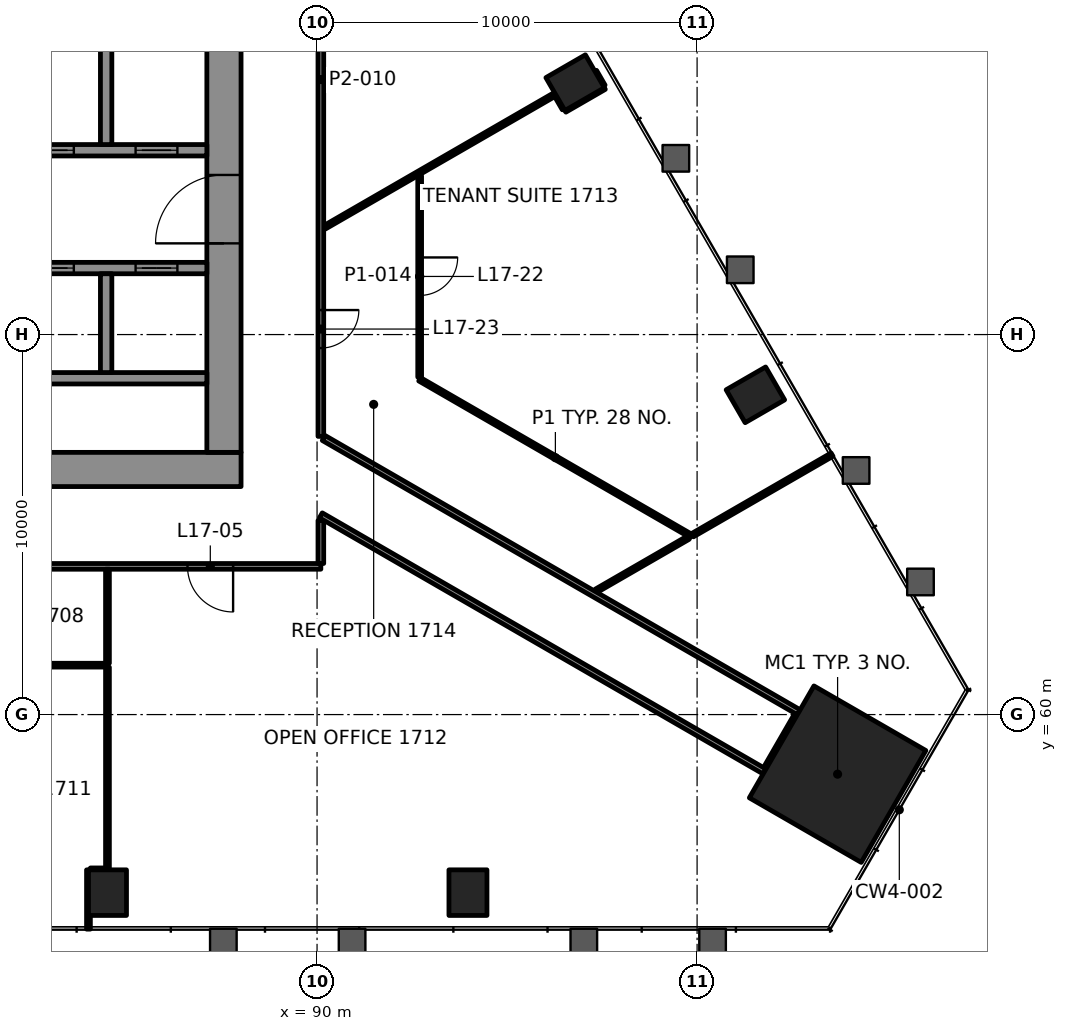
"""IFC4 building model, lengths in metres.
Left out: names, types, materials, properties, quantities, classifications, styles, units other than length and angle.
Written with IfcOpenShell. Run it as: python <this file> out.ifc"""

import sys

from ifc_helpers import new_model, si_unit, direction, frame, frame_2d, origin, origin_2d, place, context, subcontext, project, spatial, rectangle, extrude, element, fill, save


model = new_model("IFC4")
c1 = context("Model", 3, precision=1e-05, world=origin(), true_north=direction((0.0, 1.0)))
c2 = subcontext(c1, "Body", "Model", "MODEL_VIEW")
j1 = project(units=[si_unit("LENGTHUNIT", "METRE"), si_unit("PLANEANGLEUNIT", "RADIAN")], contexts=[c1])
p1 = place(None, origin())
s1 = spatial("IfcSite", under=j1, at=p1, CompositionType="ELEMENT")
p2 = place(p1, origin())
s2 = spatial("IfcBuilding", under=s1, at=p2, CompositionType="ELEMENT")
p3 = place(p2, frame((0.0, 0.0, 77.8)))
s3 = spatial("IfcBuildingStorey", under=s2, at=p3, CompositionType="ELEMENT", Elevation=77.8)
p4 = place(p3, frame((103.697, 58.432, 0.0), z_axis=(0.0, 0.0, 1.0), x_axis=(0.5, 0.866025403784, 0.0)))
e1 = element("IfcColumn", 1, at=p4, inside=s3, PredefinedType="COLUMN", context=c2, shape_type="SweptSolid", body=[
    extrude(rectangle(XDim=3.4, YDim=3.4, at=origin_2d()), origin(), (0.0, 0.0, 1.0), 4.2),
])
for number, where, z_axis, x_axis in (
    (2, (84.485, 55.314, -0.0), (0.0, 0.0, 1.0), (1.0, 0.0, 0.0)),
    (3, (93.971, 55.314, -0.0), (0.0, 0.0, 1.0), (1.0, 0.0, 0.0)),
    (4, (101.534, 68.414, -0.0), (0.0, 0.0, 1.0), (-0.5, 0.866, 0.0)),
    (5, (96.791, 76.628, -0.0), (0.0, 0.0, 1.0), (-0.5, 0.866, 0.0)),
):
    element("IfcColumn", number, at=place(p3, frame(where, z_axis=z_axis, x_axis=x_axis)), inside=s3, PredefinedType="COLUMN", context=c2, shape_type="SweptSolid", body=[
        extrude(rectangle(XDim=1.0, YDim=1.2, at=origin_2d()), origin(), (0.0, 0.0, 1.0), 4.2),
    ])
p5 = place(p3, frame((62.0, 66.45, 0.0), z_axis=(0.0, 0.0, 1.0), x_axis=(1.0, 0.0, 0.0)))
e6 = element("IfcWall", 6, at=p5, inside=s3, PredefinedType="SHEAR", context=c2, shape_type="SweptSolid", body=[
    extrude(rectangle(XDim=26.0, YDim=0.9, at=frame_2d((13.0, 0.0))), origin(), (0.0, 0.0, 1.0), 4.0),
])
p6 = place(p5, frame((3.45, 0.0, 0.0)))
e7 = element("IfcOpeningElement", 7, at=p6, cuts=e6, PredefinedType="OPENING", context=c2, shape_type="SweptSolid", body=[
    extrude(rectangle(XDim=0.9, YDim=2.1, at=frame_2d((0.45, 1.05))), frame((0.0, 0.46, 0.0), z_axis=(0.0, -1.0, 0.0), x_axis=(1.0, 0.0, 0.0)), (0.0, 0.0, 1.0), 0.92),
])
p7 = place(p5, frame((5.637, 0.0, 0.0)))
e8 = element("IfcOpeningElement", 8, at=p7, cuts=e6, PredefinedType="OPENING", context=c2, shape_type="SweptSolid", body=[
    extrude(rectangle(XDim=0.9, YDim=2.1, at=frame_2d((0.45, 1.05))), frame((0.0, 0.46, 0.0), z_axis=(0.0, -1.0, 0.0), x_axis=(1.0, 0.0, 0.0)), (0.0, 0.0, 1.0), 0.92),
])
p8 = place(p5, frame((7.212, 0.0, 0.0)))
e9 = element("IfcOpeningElement", 9, at=p8, cuts=e6, PredefinedType="OPENING", context=c2, shape_type="SweptSolid", body=[
    extrude(rectangle(XDim=0.9, YDim=2.1, at=frame_2d((0.45, 1.05))), frame((0.0, 0.46, 0.0), z_axis=(0.0, -1.0, 0.0), x_axis=(1.0, 0.0, 0.0)), (0.0, 0.0, 1.0), 0.92),
])
p9 = place(p5, frame((8.999, 0.0, 0.0)))
e10 = element("IfcOpeningElement", 10, at=p9, cuts=e6, PredefinedType="OPENING", context=c2, shape_type="SweptSolid", body=[
    extrude(rectangle(XDim=0.9, YDim=2.1, at=frame_2d((0.45, 1.05))), frame((0.0, 0.46, 0.0), z_axis=(0.0, -1.0, 0.0), x_axis=(1.0, 0.0, 0.0)), (0.0, 0.0, 1.0), 0.92),
])
p10 = place(p5, frame((17.324, 0.0, 0.0)))
e11 = element("IfcOpeningElement", 11, at=p10, cuts=e6, PredefinedType="OPENING", context=c2, shape_type="SweptSolid", body=[
    extrude(rectangle(XDim=0.9, YDim=2.1, at=frame_2d((0.45, 1.05))), frame((0.0, 0.46, 0.0), z_axis=(0.0, -1.0, 0.0), x_axis=(1.0, 0.0, 0.0)), (0.0, 0.0, 1.0), 0.92),
])
p11 = place(p3, frame((87.55, 66.9, 0.0), z_axis=(0.0, 0.0, 1.0), x_axis=(0.0, 1.0, 0.0)))
e12 = element("IfcWall", 12, at=p11, inside=s3, PredefinedType="SHEAR", context=c2, shape_type="SweptSolid", body=[
    extrude(rectangle(XDim=16.2, YDim=0.9, at=frame_2d((8.1, 0.0))), origin(), (0.0, 0.0, 1.0), 4.0),
])
p12 = place(p11, frame((5.5, 0.0, 0.0)))
e13 = element("IfcOpeningElement", 13, at=p12, cuts=e12, PredefinedType="OPENING", context=c2, shape_type="SweptSolid", body=[
    extrude(rectangle(XDim=1.8, YDim=2.1, at=frame_2d((0.9, 1.05))), frame((0.0, 0.46, 0.0), z_axis=(0.0, -1.0, 0.0), x_axis=(1.0, 0.0, 0.0)), (0.0, 0.0, 1.0), 0.92),
])
p13 = place(p11, frame((11.202, 0.0, 0.0)))
e14 = element("IfcOpeningElement", 14, at=p13, cuts=e12, PredefinedType="OPENING", context=c2, shape_type="SweptSolid", body=[
    extrude(rectangle(XDim=0.9, YDim=2.1, at=frame_2d((0.45, 1.05))), frame((0.0, 0.46, 0.0), z_axis=(0.0, -1.0, 0.0), x_axis=(1.0, 0.0, 0.0)), (0.0, 0.0, 1.0), 0.92),
])
p14 = place(p3, frame((70.35, 68.85, 0.0), z_axis=(0.0, 0.0, 1.0), x_axis=(1.0, 0.0, 0.0)))
e15 = element("IfcWall", 15, at=p14, inside=s3, PredefinedType="SHEAR", context=c2, shape_type="SweptSolid", body=[
    extrude(rectangle(XDim=16.75, YDim=0.3, at=frame_2d((8.375, 0.0))), origin(), (0.0, 0.0, 1.0), 4.0),
])
p15 = place(p3, frame((70.3, 71.75, 0.0), z_axis=(0.0, 0.0, 1.0), x_axis=(1.0, 0.0, 0.0)))
e16 = element("IfcWall", 16, at=p15, inside=s3, PredefinedType="SHEAR", context=c2, shape_type="SweptSolid", body=[
    extrude(rectangle(XDim=16.8, YDim=0.3, at=frame_2d((8.4, 0.0))), origin(), (0.0, 0.0, 1.0), 4.0),
])
p16 = place(p15, frame((1.0, 0.0, 0.0)))
e17 = element("IfcOpeningElement", 17, at=p16, cuts=e16, PredefinedType="OPENING", context=c2, shape_type="SweptSolid", body=[
    extrude(rectangle(XDim=1.1, YDim=2.1, at=frame_2d((0.55, 1.05))), frame((0.0, 0.16, 0.0), z_axis=(0.0, -1.0, 0.0), x_axis=(1.0, 0.0, 0.0)), (0.0, 0.0, 1.0), 0.32),
])
p17 = place(p15, frame((3.8, 0.0, 0.0)))
e18 = element("IfcOpeningElement", 18, at=p17, cuts=e16, PredefinedType="OPENING", context=c2, shape_type="SweptSolid", body=[
    extrude(rectangle(XDim=1.1, YDim=2.1, at=frame_2d((0.55, 1.05))), frame((0.0, 0.16, 0.0), z_axis=(0.0, -1.0, 0.0), x_axis=(1.0, 0.0, 0.0)), (0.0, 0.0, 1.0), 0.32),
])
p18 = place(p15, frame((6.6, 0.0, 0.0)))
e19 = element("IfcOpeningElement", 19, at=p18, cuts=e16, PredefinedType="OPENING", context=c2, shape_type="SweptSolid", body=[
    extrude(rectangle(XDim=1.1, YDim=2.1, at=frame_2d((0.55, 1.05))), frame((0.0, 0.16, 0.0), z_axis=(0.0, -1.0, 0.0), x_axis=(1.0, 0.0, 0.0)), (0.0, 0.0, 1.0), 0.32),
])
p19 = place(p15, frame((9.4, 0.0, 0.0)))
e20 = element("IfcOpeningElement", 20, at=p19, cuts=e16, PredefinedType="OPENING", context=c2, shape_type="SweptSolid", body=[
    extrude(rectangle(XDim=1.1, YDim=2.1, at=frame_2d((0.55, 1.05))), frame((0.0, 0.16, 0.0), z_axis=(0.0, -1.0, 0.0), x_axis=(1.0, 0.0, 0.0)), (0.0, 0.0, 1.0), 0.32),
])
p20 = place(p15, frame((12.2, 0.0, 0.0)))
e21 = element("IfcOpeningElement", 21, at=p20, cuts=e16, PredefinedType="OPENING", context=c2, shape_type="SweptSolid", body=[
    extrude(rectangle(XDim=1.1, YDim=2.1, at=frame_2d((0.55, 1.05))), frame((0.0, 0.16, 0.0), z_axis=(0.0, -1.0, 0.0), x_axis=(1.0, 0.0, 0.0)), (0.0, 0.0, 1.0), 0.32),
])
p21 = place(p15, frame((14.925, 0.0, 0.0)))
e22 = element("IfcOpeningElement", 22, at=p21, cuts=e16, PredefinedType="OPENING", context=c2, shape_type="SweptSolid", body=[
    extrude(rectangle(XDim=1.1, YDim=2.1, at=frame_2d((0.55, 1.05))), frame((0.0, 0.16, 0.0), z_axis=(0.0, -1.0, 0.0), x_axis=(1.0, 0.0, 0.0)), (0.0, 0.0, 1.0), 0.32),
])
p22 = place(p3, frame((70.3, 74.85, 0.0), z_axis=(0.0, 0.0, 1.0), x_axis=(1.0, 0.0, 0.0)))
e23 = element("IfcWall", 23, at=p22, inside=s3, PredefinedType="SHEAR", context=c2, shape_type="SweptSolid", body=[
    extrude(rectangle(XDim=16.8, YDim=0.3, at=frame_2d((8.4, 0.0))), origin(), (0.0, 0.0, 1.0), 4.0),
])
p23 = place(p22, frame((3.8, 0.0, 0.0)))
e24 = element("IfcOpeningElement", 24, at=p23, cuts=e23, PredefinedType="OPENING", context=c2, shape_type="SweptSolid", body=[
    extrude(rectangle(XDim=1.1, YDim=2.1, at=frame_2d((0.55, 1.05))), frame((0.0, 0.16, 0.0), z_axis=(0.0, -1.0, 0.0), x_axis=(1.0, 0.0, 0.0)), (0.0, 0.0, 1.0), 0.32),
])
p24 = place(p22, frame((12.2, 0.0, 0.0)))
e25 = element("IfcOpeningElement", 25, at=p24, cuts=e23, PredefinedType="OPENING", context=c2, shape_type="SweptSolid", body=[
    extrude(rectangle(XDim=1.1, YDim=2.1, at=frame_2d((0.55, 1.05))), frame((0.0, 0.16, 0.0), z_axis=(0.0, -1.0, 0.0), x_axis=(1.0, 0.0, 0.0)), (0.0, 0.0, 1.0), 0.32),
])
p25 = place(p22, frame((14.925, 0.0, 0.0)))
e26 = element("IfcOpeningElement", 26, at=p25, cuts=e23, PredefinedType="OPENING", context=c2, shape_type="SweptSolid", body=[
    extrude(rectangle(XDim=1.1, YDim=2.1, at=frame_2d((0.55, 1.05))), frame((0.0, 0.16, 0.0), z_axis=(0.0, -1.0, 0.0), x_axis=(1.0, 0.0, 0.0)), (0.0, 0.0, 1.0), 0.32),
])
for number, where, z_axis, x_axis in (
    (27, (84.45, 69.0, 0.0), (0.0, 0.0, 1.0), (0.0, 1.0, 0.0)),
    (28, (84.45, 75.0, 0.0), (0.0, 0.0, 1.0), (0.0, 1.0, 0.0)),
):
    element("IfcWall", number, at=place(p3, frame(where, z_axis=z_axis, x_axis=x_axis)), inside=s3, PredefinedType="SHEAR", context=c2, shape_type="SweptSolid", body=[
        extrude(rectangle(XDim=2.6, YDim=0.3, at=frame_2d((1.3, 0.0))), origin(), (0.0, 0.0, 1.0), 4.0),
    ])
p26 = place(p3, frame((84.036, 55.914, 0.0), z_axis=(0.0, 0.0, 1.0), x_axis=(1.0, 0.0, 0.0)))
e29 = element("IfcWall", 29, at=p26, inside=s3, PredefinedType="PARTITIONING", context=c2, shape_type="SweptSolid", body=[
    extrude(rectangle(XDim=0.399, YDim=0.1, at=frame_2d((0.199, 0.0))), origin(), (0.0, 0.0, 1.0), 3.4),
])
p27 = place(p3, frame((58.271, 61.3, 0.0), z_axis=(0.0, 0.0, 1.0), x_axis=(1.0, 0.0, 0.0)))
e30 = element("IfcWall", 30, at=p27, inside=s3, PredefinedType="PARTITIONING", context=c2, shape_type="SweptSolid", body=[
    extrude(rectangle(XDim=26.214, YDim=0.1, at=frame_2d((13.107, 0.0))), origin(), (0.0, 0.0, 1.0), 3.4),
])
p28 = place(p27, frame((3.122, 0.0, 0.0)))
e31 = element("IfcOpeningElement", 31, at=p28, cuts=e30, PredefinedType="OPENING", context=c2, shape_type="SweptSolid", body=[
    extrude(rectangle(XDim=1.2, YDim=2.1, at=frame_2d((0.6, 1.05))), frame((0.0, 0.06, 0.0), z_axis=(0.0, -1.0, 0.0), x_axis=(1.0, 0.0, 0.0)), (0.0, 0.0, 1.0), 0.12),
])
p29 = place(p27, frame((9.957, 0.0, 0.0)))
e32 = element("IfcOpeningElement", 32, at=p29, cuts=e30, PredefinedType="OPENING", context=c2, shape_type="SweptSolid", body=[
    extrude(rectangle(XDim=0.9, YDim=2.1, at=frame_2d((0.45, 1.05))), frame((0.0, 0.06, 0.0), z_axis=(0.0, -1.0, 0.0), x_axis=(1.0, 0.0, 0.0)), (0.0, 0.0, 1.0), 0.12),
])
p30 = place(p27, frame((16.279, 0.0, 0.0)))
e33 = element("IfcOpeningElement", 33, at=p30, cuts=e30, PredefinedType="OPENING", context=c2, shape_type="SweptSolid", body=[
    extrude(rectangle(XDim=0.9, YDim=2.1, at=frame_2d((0.45, 1.05))), frame((0.0, 0.06, 0.0), z_axis=(0.0, -1.0, 0.0), x_axis=(1.0, 0.0, 0.0)), (0.0, 0.0, 1.0), 0.12),
])
p31 = place(p27, frame((22.501, 0.0, 0.0)))
e34 = element("IfcOpeningElement", 34, at=p31, cuts=e30, PredefinedType="OPENING", context=c2, shape_type="SweptSolid", body=[
    extrude(rectangle(XDim=0.9, YDim=2.1, at=frame_2d((0.45, 1.05))), frame((0.0, 0.06, 0.0), z_axis=(0.0, -1.0, 0.0), x_axis=(1.0, 0.0, 0.0)), (0.0, 0.0, 1.0), 0.12),
])
p32 = place(p3, frame((90.099, 63.9, 0.0), z_axis=(0.0, 0.0, 1.0), x_axis=(-1.0, 0.0, 0.0)))
e35 = element("IfcWall", 35, at=p32, inside=s3, PredefinedType="PARTITIONING", context=c2, shape_type="SweptSolid", body=[
    extrude(rectangle(XDim=30.199, YDim=0.15, at=frame_2d((15.1, 0.0))), origin(), (0.0, 0.0, 1.0), 3.4),
])
p33 = place(p32, frame((2.309, 0.0, 0.0)))
e36 = element("IfcOpeningElement", 36, at=p33, cuts=e35, PredefinedType="OPENING", context=c2, shape_type="SweptSolid", body=[
    extrude(rectangle(XDim=1.2, YDim=2.1, at=frame_2d((0.6, 1.05))), frame((0.0, 0.085, 0.0), z_axis=(0.0, -1.0, 0.0), x_axis=(1.0, 0.0, 0.0)), (0.0, 0.0, 1.0), 0.17),
])
p34 = place(p32, frame((14.599, 0.0, 0.0)))
e37 = element("IfcOpeningElement", 37, at=p34, cuts=e35, PredefinedType="OPENING", context=c2, shape_type="SweptSolid", body=[
    extrude(rectangle(XDim=1.0, YDim=2.1, at=frame_2d((0.5, 1.05))), frame((0.0, 0.085, 0.0), z_axis=(0.0, -1.0, 0.0), x_axis=(1.0, 0.0, 0.0)), (0.0, 0.0, 1.0), 0.17),
])
p35 = place(p32, frame((26.791, 0.0, 0.0)))
e38 = element("IfcOpeningElement", 38, at=p35, cuts=e35, PredefinedType="OPENING", context=c2, shape_type="SweptSolid", body=[
    extrude(rectangle(XDim=1.0, YDim=2.1, at=frame_2d((0.5, 1.05))), frame((0.0, 0.085, 0.0), z_axis=(0.0, -1.0, 0.0), x_axis=(1.0, 0.0, 0.0)), (0.0, 0.0, 1.0), 0.17),
])
p36 = place(p3, frame((97.343, 63.256, 0.0), z_axis=(0.0, 0.0, 1.0), x_axis=(0.866028733576, 0.499994232587, 0.0)))
e39 = element("IfcWall", 39, at=p36, inside=s3, PredefinedType="PARTITIONING", context=c2, shape_type="SweptSolid", body=[
    extrude(rectangle(XDim=2.799, YDim=0.1, at=frame_2d((1.4, 0.0))), origin(), (0.0, 0.0, 1.0), 3.4),
])
p37 = place(p3, frame((96.522, 75.896, 0.0), z_axis=(0.0, 0.0, 1.0), x_axis=(0.865978732077, 0.500080829057, 0.0)))
e40 = element("IfcWall", 40, at=p37, inside=s3, PredefinedType="PARTITIONING", context=c2, shape_type="SweptSolid", body=[
    extrude(rectangle(XDim=1.199, YDim=0.1, at=frame_2d((0.6, 0.0))), origin(), (0.0, 0.0, 1.0), 3.165),
])
p38 = place(p3, frame((90.201, 72.824, 0.0), z_axis=(0.0, 0.0, 1.0), x_axis=(0.866028979627, 0.499993806408, 0.0)))
e41 = element("IfcWall", 41, at=p38, inside=s3, PredefinedType="PARTITIONING", context=c2, shape_type="SweptSolid", body=[
    extrude(rectangle(XDim=7.009, YDim=0.1, at=frame_2d((3.505, 0.0))), origin(), (0.0, 0.0, 1.0), 3.4),
])
p39 = place(p3, frame((101.812, 58.568, 0.0), z_axis=(0.0, 0.0, 1.0), x_axis=(0.499944585209, 0.866057395165, 0.0)))
e42 = element("IfcWall", 42, at=p39, inside=s3, PredefinedType="PARTITIONING", context=c2, shape_type="SweptSolid", body=[
    extrude(rectangle(XDim=1.649, YDim=0.15, at=frame_2d((0.825, 0.0))), origin(), (0.0, 0.0, 1.0), 3.247),
])
p40 = place(p3, frame((92.7, 74.179, 0.0), z_axis=(0.0, 0.0, 1.0), x_axis=(0.0, -1.0, 0.0)))
e43 = element("IfcWall", 43, at=p40, inside=s3, PredefinedType="PARTITIONING", context=c2, shape_type="SweptSolid", body=[
    extrude(rectangle(XDim=5.299, YDim=0.1, at=frame_2d((2.649, 0.0))), origin(), (0.0, 0.0, 1.0), 3.4),
])
p41 = place(p40, frame((2.149, 0.0, 0.0)))
e44 = element("IfcOpeningElement", 44, at=p41, cuts=e43, PredefinedType="OPENING", context=c2, shape_type="SweptSolid", body=[
    extrude(rectangle(XDim=1.0, YDim=2.1, at=frame_2d((0.5, 1.05))), frame((0.0, 0.06, 0.0), z_axis=(0.0, -1.0, 0.0), x_axis=(1.0, 0.0, 0.0)), (0.0, 0.0, 1.0), 0.12),
])
p42 = place(p3, frame((90.1, 63.976, 0.0), z_axis=(0.0, 0.0, 1.0), x_axis=(0.0, 1.0, 0.0)))
e45 = element("IfcWall", 45, at=p42, inside=s3, PredefinedType="PARTITIONING", context=c2, shape_type="SweptSolid", body=[
    extrude(rectangle(XDim=1.131, YDim=0.15, at=frame_2d((0.565, 0.0))), origin(), (0.0, 0.0, 1.0), 3.247),
])
p43 = place(p3, frame((90.1, 86.099, 0.0), z_axis=(0.0, 0.0, 1.0), x_axis=(0.0, -1.0, 0.0)))
e46 = element("IfcWall", 46, at=p43, inside=s3, PredefinedType="PARTITIONING", context=c2, shape_type="SweptSolid", body=[
    extrude(rectangle(XDim=18.778, YDim=0.15, at=frame_2d((9.389, 0.0))), origin(), (0.0, 0.0, 1.0), 3.4),
])
p44 = place(p43, frame((15.455, 0.0, 0.0)))
e47 = element("IfcOpeningElement", 47, at=p44, cuts=e46, PredefinedType="OPENING", context=c2, shape_type="SweptSolid", body=[
    extrude(rectangle(XDim=1.0, YDim=2.1, at=frame_2d((0.5, 1.05))), frame((0.0, 0.085, 0.0), z_axis=(0.0, -1.0, 0.0), x_axis=(1.0, 0.0, 0.0)), (0.0, 0.0, 1.0), 0.17),
])
p45 = place(p3, frame((84.485, 55.915, 0.0), z_axis=(0.0, 0.0, 1.0), x_axis=(0.0, 1.0, 0.0)))
e48 = element("IfcWall", 48, at=p45, inside=s3, PredefinedType="PARTITIONING", context=c2, shape_type="SweptSolid", body=[
    extrude(rectangle(XDim=5.335, YDim=0.1, at=frame_2d((2.668, 0.0))), origin(), (0.0, 0.0, 1.0), 3.4),
])
p46 = place(p3, frame((83.985, 54.354, 0.0), z_axis=(0.0, 0.0, 1.0), x_axis=(0.0, 1.0, 0.0)))
e49 = element("IfcWall", 49, at=p46, inside=s3, PredefinedType="PARTITIONING", context=c2, shape_type="SweptSolid", body=[
    extrude(rectangle(XDim=1.56, YDim=0.1, at=frame_2d((0.78, 0.0))), origin(), (0.0, 0.0, 1.0), 3.165),
])
p47 = place(p3, frame((97.536, 76.539, 0.0), z_axis=(0.0, 0.0, 1.0), x_axis=(-0.499879237999, 0.866095114533, 0.0)))
e50 = element("IfcWall", 50, at=p47, inside=s3, PredefinedType="PARTITIONING", context=c2, shape_type="SweptSolid", body=[
    extrude(rectangle(XDim=0.449, YDim=0.1, at=frame_2d((0.225, 0.0))), origin(), (0.0, 0.0, 1.0), 3.4),
])
p48 = place(p3, frame((96.496, 75.939, 0.0), z_axis=(0.0, 0.0, 1.0), x_axis=(-0.499757756434, 0.866165218006, 0.0)))
e51 = element("IfcWall", 51, at=p48, inside=s3, PredefinedType="PARTITIONING", context=c2, shape_type="SweptSolid", body=[
    extrude(rectangle(XDim=0.399, YDim=0.1, at=frame_2d((0.2, 0.0))), origin(), (0.0, 0.0, 1.0), 3.4),
])
p49 = place(p3, frame((99.842, 64.699, 0.0), z_axis=(0.0, 0.0, 1.0), x_axis=(-0.866022901237, 0.500004334515, 0.0)))
e52 = element("IfcWall", 52, at=p49, inside=s3, PredefinedType="PARTITIONING", context=c2, shape_type="SweptSolid", body=[
    extrude(rectangle(XDim=8.247, YDim=0.1, at=frame_2d((4.124, 0.0))), origin(), (0.0, 0.0, 1.0), 3.4),
])
p50 = place(p3, frame((102.674, 60.062, 0.0), z_axis=(0.0, 0.0, 1.0), x_axis=(-0.866022486604, 0.50000505267, 0.0)))
e53 = element("IfcWall", 53, at=p50, inside=s3, PredefinedType="PARTITIONING", context=c2, shape_type="SweptSolid", body=[
    extrude(rectangle(XDim=14.433, YDim=0.15, at=frame_2d((7.216, 0.0))), origin(), (0.0, 0.0, 1.0), 3.4),
])
p51 = place(p3, frame((101.774, 58.503, 0.0), z_axis=(0.0, 0.0, 1.0), x_axis=(-0.866023326939, 0.500003597184, 0.0)))
e54 = element("IfcWall", 54, at=p51, inside=s3, PredefinedType="PARTITIONING", context=c2, shape_type="SweptSolid", body=[
    extrude(rectangle(XDim=13.48, YDim=0.15, at=frame_2d((6.74, 0.0))), origin(), (0.0, 0.0, 1.0), 3.247),
])
p52 = place(p3, frame((84.485, 61.35, 0.0), z_axis=(0.0, 0.0, 1.0), x_axis=(0.0, 1.0, 0.0)))
e55 = element("IfcWall", 55, at=p52, inside=s3, PredefinedType="PARTITIONING", context=c2, shape_type="SweptSolid", body=[
    extrude(rectangle(XDim=2.475, YDim=0.1, at=frame_2d((1.237, 0.0))), origin(), (0.0, 0.0, 1.0), 3.4),
])
p53 = place(p3, frame((99.879, 64.721, 0.0), z_axis=(0.0, 0.0, 1.0), x_axis=(0.866030225258, 0.499991648869, 0.0)))
e56 = element("IfcWall", 56, at=p53, inside=s3, PredefinedType="PARTITIONING", context=c2, shape_type="SweptSolid", body=[
    extrude(rectangle(XDim=4.239, YDim=0.1, at=frame_2d((2.12, 0.0))), origin(), (0.0, 0.0, 1.0), 3.4),
])
p54 = place(p33, origin())
e57 = element("IfcDoor", 57, at=p54, inside=s3, OperationType="DOUBLE_DOOR_SINGLE_SWING", PredefinedType="DOOR", context=c2, shape_type="SweptSolid", body=[
    extrude(rectangle(XDim=1.2, YDim=2.1, at=frame_2d((0.6, 1.05))), frame((0.0, 0.025, 0.0), z_axis=(0.0, -1.0, 0.0), x_axis=(1.0, 0.0, 0.0)), (0.0, 0.0, 1.0), 0.05),
])
fill(e36, e57)
p55 = place(p41, origin())
e58 = element("IfcDoor", 58, at=p55, inside=s3, OperationType="SINGLE_SWING_LEFT", PredefinedType="DOOR", context=c2, shape_type="SweptSolid", body=[
    extrude(rectangle(XDim=1.0, YDim=2.1, at=frame_2d((0.5, 1.05))), frame((0.0, 0.025, 0.0), z_axis=(0.0, -1.0, 0.0), x_axis=(1.0, 0.0, 0.0)), (0.0, 0.0, 1.0), 0.05),
])
fill(e44, e58)
p56 = place(p44, origin())
e59 = element("IfcDoor", 59, at=p56, inside=s3, OperationType="SINGLE_SWING_RIGHT", PredefinedType="DOOR", context=c2, shape_type="SweptSolid", body=[
    extrude(rectangle(XDim=1.0, YDim=2.1, at=frame_2d((0.5, 1.05))), frame((0.0, 0.025, 0.0), z_axis=(0.0, -1.0, 0.0), x_axis=(1.0, 0.0, 0.0)), (0.0, 0.0, 1.0), 0.05),
])
fill(e47, e59)
p57 = place(p20, origin())
e60 = element("IfcDoor", 60, at=p57, inside=s3, OperationType="DOUBLE_DOOR_SLIDING", PredefinedType="DOOR", context=c2, shape_type="SweptSolid", body=[
    extrude(rectangle(XDim=1.1, YDim=2.1, at=frame_2d((0.55, 1.05))), frame((0.0, 0.025, 0.0), z_axis=(0.0, -1.0, 0.0), x_axis=(1.0, 0.0, 0.0)), (0.0, 0.0, 1.0), 0.05),
])
fill(e21, e60)
p58 = place(p21, origin())
e61 = element("IfcDoor", 61, at=p58, inside=s3, OperationType="DOUBLE_DOOR_SLIDING", PredefinedType="DOOR", context=c2, shape_type="SweptSolid", body=[
    extrude(rectangle(XDim=1.1, YDim=2.1, at=frame_2d((0.55, 1.05))), frame((0.0, 0.025, 0.0), z_axis=(0.0, -1.0, 0.0), x_axis=(1.0, 0.0, 0.0)), (0.0, 0.0, 1.0), 0.05),
])
fill(e22, e61)
p59 = place(p24, origin())
e62 = element("IfcDoor", 62, at=p59, inside=s3, OperationType="DOUBLE_DOOR_SLIDING", PredefinedType="DOOR", context=c2, shape_type="SweptSolid", body=[
    extrude(rectangle(XDim=1.1, YDim=2.1, at=frame_2d((0.55, 1.05))), frame((0.0, 0.025, 0.0), z_axis=(0.0, -1.0, 0.0), x_axis=(1.0, 0.0, 0.0)), (0.0, 0.0, 1.0), 0.05),
])
fill(e25, e62)
p60 = place(p25, origin())
e63 = element("IfcDoor", 63, at=p60, inside=s3, OperationType="DOUBLE_DOOR_SLIDING", PredefinedType="DOOR", context=c2, shape_type="SweptSolid", body=[
    extrude(rectangle(XDim=1.1, YDim=2.1, at=frame_2d((0.55, 1.05))), frame((0.0, 0.025, 0.0), z_axis=(0.0, -1.0, 0.0), x_axis=(1.0, 0.0, 0.0)), (0.0, 0.0, 1.0), 0.05),
])
fill(e26, e63)
p61 = place(p12, origin())
e64 = element("IfcDoor", 64, at=p61, inside=s3, OperationType="SINGLE_SWING_RIGHT", PredefinedType="DOOR", context=c2, shape_type="SweptSolid", body=[
    extrude(rectangle(XDim=1.8, YDim=2.1, at=frame_2d((0.9, 1.05))), frame((0.0, 0.17, 0.0), z_axis=(0.0, -1.0, 0.0), x_axis=(1.0, 0.0, 0.0)), (0.0, 0.0, 1.0), 0.34),
])
fill(e13, e64)
save(model, sys.argv[1])
